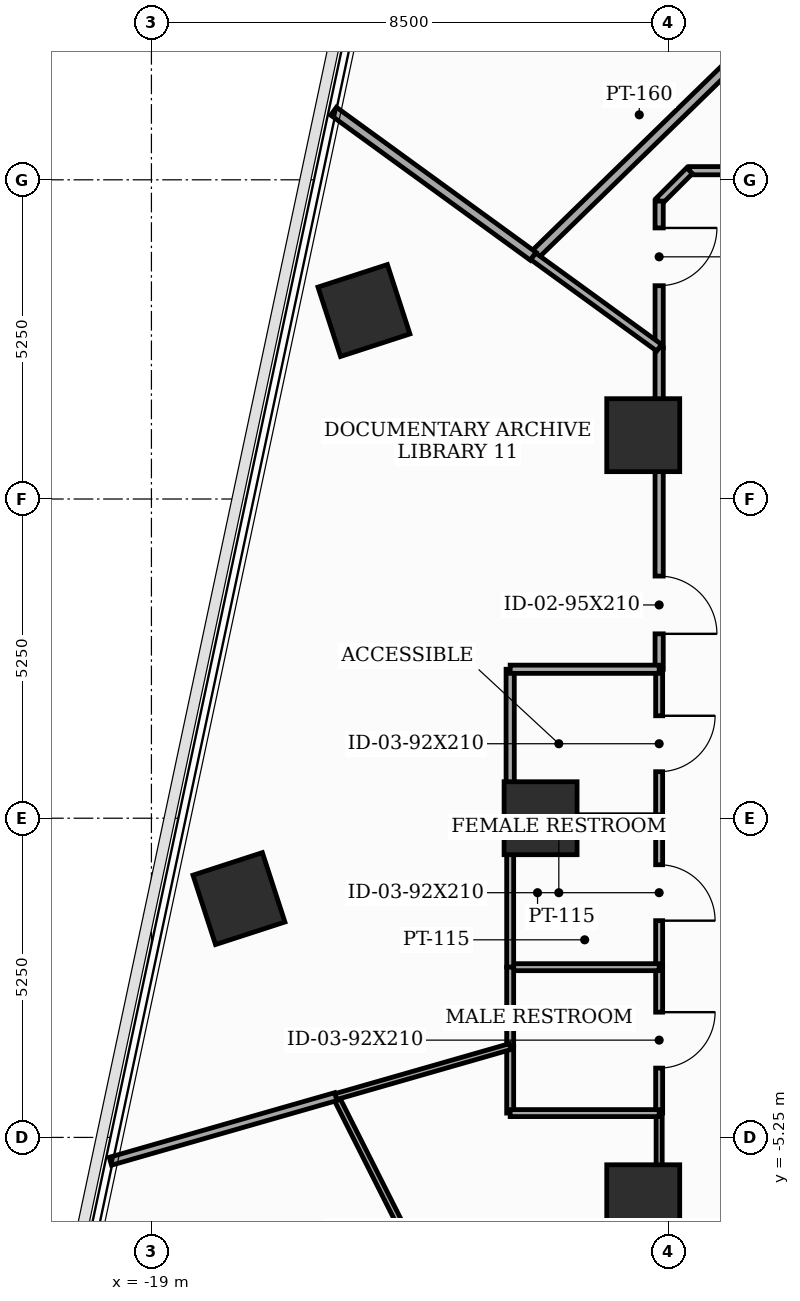
"""IFC4 building model, lengths in metres.
Left out: names, types, materials, properties, quantities, classifications, styles, units other than length and angle.
Written with IfcOpenShell. Run it as: python <this file> out.ifc"""

import sys

from ifc_helpers import new_model, si_unit, direction, frame, frame_2d, origin, origin_2d, place, context, subcontext, project, spatial, rectangle, extrude, element, fill, save


model = new_model("IFC4")
c1 = context("Model", 3, precision=1e-05, world=origin(), true_north=direction((0.0, 1.0)))
c2 = subcontext(c1, "Body", "Model", "MODEL_VIEW")
j1 = project(units=[si_unit("LENGTHUNIT", "METRE"), si_unit("PLANEANGLEUNIT", "RADIAN")], contexts=[c1])
p1 = place(None, origin())
s1 = spatial("IfcSite", under=j1, at=p1, CompositionType="ELEMENT")
p2 = place(p1, origin())
s2 = spatial("IfcBuilding", under=s1, at=p2, CompositionType="ELEMENT")
p3 = place(p2, frame((0.0, 0.0, 94.0)))
s3 = spatial("IfcBuildingStorey", under=s2, at=p3, CompositionType="ELEMENT", Elevation=94.0)
for number, where, z_axis, x_axis in (
    (1, (-10.912, 6.3, 0.0), (0.0, 0.0, 1.0), (1.0, 0.0, 0.0)),
    (2, (-12.6, 0.0, 0.0), (0.0, 0.0, 1.0), (1.0, 0.0, 0.0)),
    (3, (-10.912, -6.3, 0.0), (0.0, 0.0, 1.0), (1.0, 0.0, 0.0)),
    (4, (-15.505, 8.35, 0.0), (0.0, 0.0, 1.0), (0.951, 0.309, 0.0)),
    (5, (-17.561, -1.322, 0.0), (0.0, 0.0, 1.0), (0.951, 0.309, 0.0)),
):
    element("IfcColumn", number, at=place(p3, frame(where, z_axis=z_axis, x_axis=x_axis)), inside=s3, PredefinedType="COLUMN", context=c2, shape_type="SweptSolid", body=[
        extrude(rectangle(XDim=1.2, YDim=1.2, at=origin_2d()), origin(), (0.0, 0.0, 1.0), 3.7),
    ])
p4 = place(p3, frame((-10.65, 0.0, 0.0), z_axis=(0.0, 0.0, 1.0), x_axis=(0.0, -1.0, 0.0)))
e6 = element("IfcWall", 6, at=p4, inside=s3, PredefinedType="PARTITIONING", context=c2, shape_type="SweptSolid", body=[
    extrude(rectangle(XDim=2.45, YDim=0.115, at=frame_2d((1.225, 0.0))), origin(), (0.0, 0.0, 1.0), 2.785),
])
p5 = place(p4, frame((0.765, 0.0, 0.0)))
e7 = element("IfcOpeningElement", 7, at=p5, cuts=e6, PredefinedType="OPENING", context=c2, shape_type="SweptSolid", body=[
    extrude(rectangle(XDim=0.92, YDim=2.1, at=frame_2d((0.46, 1.05))), frame((0.0, 0.067, 0.0), z_axis=(0.0, -1.0, 0.0), x_axis=(1.0, 0.0, 0.0)), (0.0, 0.0, 1.0), 0.135),
])
p6 = place(p3, frame((-10.65, -2.45, 0.0), z_axis=(0.0, 0.0, 1.0), x_axis=(0.0, -1.0, 0.0)))
e8 = element("IfcWall", 8, at=p6, inside=s3, PredefinedType="PARTITIONING", context=c2, shape_type="SweptSolid", body=[
    extrude(rectangle(XDim=2.4, YDim=0.115, at=frame_2d((1.2, 0.0))), origin(), (0.0, 0.0, 1.0), 3.5),
])
p7 = place(p6, frame((0.74, 0.0, 0.0)))
e9 = element("IfcOpeningElement", 9, at=p7, cuts=e8, PredefinedType="OPENING", context=c2, shape_type="SweptSolid", body=[
    extrude(rectangle(XDim=0.92, YDim=2.1, at=frame_2d((0.46, 1.05))), frame((0.0, 0.067, 0.0), z_axis=(0.0, -1.0, 0.0), x_axis=(1.0, 0.0, 0.0)), (0.0, 0.0, 1.0), 0.135),
])
p8 = place(p3, frame((-10.65, -4.85, 0.0), z_axis=(0.0, 0.0, 1.0), x_axis=(0.0, -1.0, 0.0)))
e10 = element("IfcWall", 10, at=p8, inside=s3, PredefinedType="MOVABLE", context=c2, shape_type="SweptSolid", body=[
    extrude(rectangle(XDim=5.3, YDim=0.1, at=frame_2d((2.65, 0.0))), origin(), (0.0, 0.0, 1.0), 2.785),
])
p9 = place(p8, frame((3.765, 0.0, 0.0)))
e11 = element("IfcOpeningElement", 11, at=p9, cuts=e10, PredefinedType="OPENING", context=c2, shape_type="SweptSolid", body=[
    extrude(rectangle(XDim=0.95, YDim=2.1, at=frame_2d((0.475, 1.05))), frame((0.0, 0.06, 0.0), z_axis=(0.0, -1.0, 0.0), x_axis=(1.0, 0.0, 0.0)), (0.0, 0.0, 1.0), 0.12),
])
p10 = place(p3, frame((-2.264, 10.65, 0.0), z_axis=(0.0, 0.0, 1.0), x_axis=(-1.0, 0.0, 0.0)))
e12 = element("IfcWall", 12, at=p10, inside=s3, PredefinedType="PARTITIONING", context=c2, shape_type="SweptSolid", body=[
    extrude(rectangle(XDim=7.886, YDim=0.135, at=frame_2d((3.943, 0.0))), origin(), (0.0, 0.0, 1.0), 2.785),
])
p11 = place(p3, frame((-10.15, 10.65, 0.0), z_axis=(0.0, 0.0, 1.0), x_axis=(-0.707106781187, -0.707106781187, 0.0)))
e13 = element("IfcWall", 13, at=p11, inside=s3, PredefinedType="PARTITIONING", context=c2, shape_type="SweptSolid", body=[
    extrude(rectangle(XDim=0.707, YDim=0.135, at=frame_2d((0.354, 0.0))), origin(), (0.0, 0.0, 1.0), 3.5),
])
p12 = place(p3, frame((-10.65, 10.15, 0.0), z_axis=(0.0, 0.0, 1.0), x_axis=(0.0, -1.0, 0.0)))
e14 = element("IfcWall", 14, at=p12, inside=s3, PredefinedType="PARTITIONING", context=c2, shape_type="SweptSolid", body=[
    extrude(rectangle(XDim=2.412, YDim=0.135, at=frame_2d((1.206, 0.0))), origin(), (0.0, 0.0, 1.0), 3.5),
])
p13 = place(p12, frame((0.442, 0.0, 0.0)))
e15 = element("IfcOpeningElement", 15, at=p13, cuts=e14, PredefinedType="OPENING", context=c2, shape_type="SweptSolid", body=[
    extrude(rectangle(XDim=0.95, YDim=2.1, at=frame_2d((0.475, 1.05))), frame((0.0, 0.077, 0.0), z_axis=(0.0, -1.0, 0.0), x_axis=(1.0, 0.0, 0.0)), (0.0, 0.0, 1.0), 0.155),
])
p14 = place(p3, frame((-10.65, 7.738, 0.0), z_axis=(0.0, 0.0, 1.0), x_axis=(0.0, -1.0, 0.0)))
e16 = element("IfcWall", 16, at=p14, inside=s3, PredefinedType="PARTITIONING", context=c2, shape_type="SweptSolid", body=[
    extrude(rectangle(XDim=5.288, YDim=0.135, at=frame_2d((2.644, 0.0))), origin(), (0.0, 0.0, 1.0), 2.785),
])
p15 = place(p14, frame((3.755, 0.0, 0.0)))
e17 = element("IfcOpeningElement", 17, at=p15, cuts=e16, PredefinedType="OPENING", context=c2, shape_type="SweptSolid", body=[
    extrude(rectangle(XDim=0.95, YDim=2.1, at=frame_2d((0.475, 1.05))), frame((0.0, 0.077, 0.0), z_axis=(0.0, -1.0, 0.0), x_axis=(1.0, 0.0, 0.0)), (0.0, 0.0, 1.0), 0.155),
])
p16 = place(p3, frame((-10.65, 2.45, 0.0), z_axis=(0.0, 0.0, 1.0), x_axis=(0.0, -1.0, 0.0)))
e18 = element("IfcWall", 18, at=p16, inside=s3, PredefinedType="PARTITIONING", context=c2, shape_type="SweptSolid", body=[
    extrude(rectangle(XDim=2.45, YDim=0.115, at=frame_2d((1.225, 0.0))), origin(), (0.0, 0.0, 1.0), 2.785),
])
p17 = place(p16, frame((0.765, 0.0, 0.0)))
e19 = element("IfcOpeningElement", 19, at=p17, cuts=e18, PredefinedType="OPENING", context=c2, shape_type="SweptSolid", body=[
    extrude(rectangle(XDim=0.92, YDim=2.1, at=frame_2d((0.46, 1.05))), frame((0.0, 0.067, 0.0), z_axis=(0.0, -1.0, 0.0), x_axis=(1.0, 0.0, 0.0)), (0.0, 0.0, 1.0), 0.135),
])
p18 = place(p3, frame((-13.1, -2.45, 0.0), z_axis=(0.0, 0.0, 1.0), x_axis=(1.0, 0.0, 0.0)))
e20 = element("IfcWall", 20, at=p18, inside=s3, PredefinedType="PARTITIONING", context=c2, shape_type="SweptSolid", body=[
    extrude(rectangle(XDim=2.45, YDim=0.115, at=frame_2d((1.225, 0.0))), origin(), (0.0, 0.0, 1.0), 2.785),
])
p19 = place(p3, frame((-13.1, 0.0, 0.0), z_axis=(0.0, 0.0, 1.0), x_axis=(0.0, -1.0, 0.0)))
e21 = element("IfcWall", 21, at=p19, inside=s3, PredefinedType="PARTITIONING", context=c2, shape_type="SweptSolid", body=[
    extrude(rectangle(XDim=2.45, YDim=0.115, at=frame_2d((1.225, 0.0))), origin(), (0.0, 0.0, 1.0), 2.785),
])
p20 = place(p3, frame((-10.65, 0.0, 0.0), z_axis=(0.0, 0.0, 1.0), x_axis=(-1.0, 0.0, 0.0)))
e22 = element("IfcWall", 22, at=p20, inside=s3, PredefinedType="PARTITIONING", context=c2, shape_type="SweptSolid", body=[
    extrude(rectangle(XDim=2.45, YDim=0.115, at=frame_2d((1.225, 0.0))), origin(), (0.0, 0.0, 1.0), 2.785),
])
p21 = place(p3, frame((-13.1, -3.756, 0.0), z_axis=(0.0, 0.0, 1.0), x_axis=(0.0, -1.0, 0.0)))
e23 = element("IfcWall", 23, at=p21, inside=s3, PredefinedType="PARTITIONING", context=c2, shape_type="SweptSolid", body=[
    extrude(rectangle(XDim=1.094, YDim=0.115, at=frame_2d((0.547, 0.0))), origin(), (0.0, 0.0, 1.0), 3.5),
])
p22 = place(p3, frame((-13.1, -4.85, 0.0), z_axis=(0.0, 0.0, 1.0), x_axis=(1.0, 0.0, 0.0)))
e24 = element("IfcWall", 24, at=p22, inside=s3, PredefinedType="PARTITIONING", context=c2, shape_type="SweptSolid", body=[
    extrude(rectangle(XDim=2.45, YDim=0.115, at=frame_2d((1.225, 0.0))), origin(), (0.0, 0.0, 1.0), 2.785),
])
p23 = place(p3, frame((-13.1, -2.45, 0.0), z_axis=(0.0, 0.0, 1.0), x_axis=(0.0, -1.0, 0.0)))
e25 = element("IfcWall", 25, at=p23, inside=s3, PredefinedType="PARTITIONING", context=c2, shape_type="SweptSolid", body=[
    extrude(rectangle(XDim=1.306, YDim=0.115, at=frame_2d((0.653, 0.0))), origin(), (0.0, 0.0, 1.0), 3.5),
])
p24 = place(p3, frame((-15.968, -4.579, 0.0), z_axis=(0.0, 0.0, 1.0), x_axis=(0.450166439867, -0.892944665933, 0.0)))
e26 = element("IfcWall", 26, at=p24, inside=s3, PredefinedType="MOVABLE", context=c2, shape_type="SweptSolid", body=[
    extrude(rectangle(XDim=6.642, YDim=0.1, at=frame_2d((3.321, 0.0))), origin(), (0.0, 0.0, 1.0), 2.785),
])
p25 = place(p3, frame((-13.1, -3.756, 0.0), z_axis=(0.0, 0.0, 1.0), x_axis=(-0.961205264208, -0.275834080671, 0.0)))
e27 = element("IfcWall", 27, at=p25, inside=s3, PredefinedType="MOVABLE", context=c2, shape_type="SweptSolid", body=[
    extrude(rectangle(XDim=2.984, YDim=0.1, at=frame_2d((1.492, 0.0))), origin(), (0.0, 0.0, 1.0), 3.125),
])
p26 = place(p3, frame((-15.968, -4.579, 0.0), z_axis=(0.0, 0.0, 1.0), x_axis=(-0.961294264275, -0.275523751194, 0.0)))
e28 = element("IfcWall", 28, at=p26, inside=s3, PredefinedType="PARTITIONING", context=c2, shape_type="SweptSolid", body=[
    extrude(rectangle(XDim=3.856, YDim=0.135, at=frame_2d((1.928, 0.0))), origin(), (0.0, 0.0, 1.0), 2.935),
])
p27 = place(p3, frame((-12.721, 9.242, 0.0), z_axis=(0.0, 0.0, 1.0), x_axis=(0.716351016203, 0.697740081682, 0.0)))
e29 = element("IfcWall", 29, at=p27, inside=s3, PredefinedType="PARTITIONING", context=c2, shape_type="SweptSolid", body=[
    extrude(rectangle(XDim=5.746, YDim=0.16, at=frame_2d((2.873, 0.0))), origin(), (0.0, 0.0, 1.0), 2.785),
])
p28 = place(p3, frame((-16.004, 11.628, 0.0), z_axis=(0.0, 0.0, 1.0), x_axis=(0.80899612579, -0.587813974364, 0.0)))
e30 = element("IfcWall", 30, at=p28, inside=s3, PredefinedType="PARTITIONING", context=c2, shape_type="SweptSolid", body=[
    extrude(rectangle(XDim=4.059, YDim=0.16, at=frame_2d((2.029, 0.0))), origin(), (0.0, 0.0, 1.0), 2.925),
])
p29 = place(p3, frame((-12.721, 9.242, 0.0), z_axis=(0.0, 0.0, 1.0), x_axis=(0.80916485127, -0.58758169089, 0.0)))
e31 = element("IfcWall", 31, at=p29, inside=s3, PredefinedType="PARTITIONING", context=c2, shape_type="SweptSolid", body=[
    extrude(rectangle(XDim=2.56, YDim=0.135, at=frame_2d((1.28, 0.0))), origin(), (0.0, 0.0, 1.0), 3.125),
])
p30 = place(p3, frame((-13.1, 0.0, 0.0), z_axis=(0.0, 0.0, 1.0), x_axis=(0.0, 1.0, 0.0)))
e32 = element("IfcWall", 32, at=p30, inside=s3, PredefinedType="PARTITIONING", context=c2, shape_type="SweptSolid", body=[
    extrude(rectangle(XDim=2.45, YDim=0.135, at=frame_2d((1.225, 0.0))), origin(), (0.0, 0.0, 1.0), 2.785),
])
p31 = place(p3, frame((-13.1, 2.45, 0.0), z_axis=(0.0, 0.0, 1.0), x_axis=(1.0, 0.0, 0.0)))
e33 = element("IfcWall", 33, at=p31, inside=s3, PredefinedType="PARTITIONING", context=c2, shape_type="SweptSolid", body=[
    extrude(rectangle(XDim=2.45, YDim=0.135, at=frame_2d((1.225, 0.0))), origin(), (0.0, 0.0, 1.0), 2.785),
])
p32 = place(p5, origin())
e34 = element("IfcDoor", 34, at=p32, inside=s3, OperationType="SINGLE_SWING_RIGHT", PredefinedType="DOOR", context=c2, shape_type="SweptSolid", body=[
    extrude(rectangle(XDim=0.92, YDim=2.1, at=frame_2d((0.46, 1.05))), frame((0.0, 0.025, 0.0), z_axis=(0.0, -1.0, 0.0), x_axis=(1.0, 0.0, 0.0)), (0.0, 0.0, 1.0), 0.05),
])
fill(e7, e34)
p33 = place(p7, origin())
e35 = element("IfcDoor", 35, at=p33, inside=s3, OperationType="SINGLE_SWING_LEFT", PredefinedType="DOOR", context=c2, shape_type="SweptSolid", body=[
    extrude(rectangle(XDim=0.92, YDim=2.1, at=frame_2d((0.46, 1.05))), frame((0.0, 0.025, 0.0), z_axis=(0.0, -1.0, 0.0), x_axis=(1.0, 0.0, 0.0)), (0.0, 0.0, 1.0), 0.05),
])
fill(e9, e35)
p34 = place(p13, origin())
e36 = element("IfcDoor", 36, at=p34, inside=s3, OperationType="SINGLE_SWING_LEFT", PredefinedType="DOOR", context=c2, shape_type="SweptSolid", body=[
    extrude(rectangle(XDim=0.95, YDim=2.1, at=frame_2d((0.475, 1.05))), frame((0.0, 0.025, 0.0), z_axis=(0.0, -1.0, 0.0), x_axis=(1.0, 0.0, 0.0)), (0.0, 0.0, 1.0), 0.05),
])
fill(e15, e36)
p35 = place(p15, origin())
e37 = element("IfcDoor", 37, at=p35, inside=s3, OperationType="SINGLE_SWING_RIGHT", PredefinedType="DOOR", context=c2, shape_type="SweptSolid", body=[
    extrude(rectangle(XDim=0.95, YDim=2.1, at=frame_2d((0.475, 1.05))), frame((0.0, 0.025, 0.0), z_axis=(0.0, -1.0, 0.0), x_axis=(1.0, 0.0, 0.0)), (0.0, 0.0, 1.0), 0.05),
])
fill(e17, e37)
p36 = place(p17, origin())
e38 = element("IfcDoor", 38, at=p36, inside=s3, OperationType="SINGLE_SWING_LEFT", PredefinedType="DOOR", context=c2, shape_type="SweptSolid", body=[
    extrude(rectangle(XDim=0.92, YDim=2.1, at=frame_2d((0.46, 1.05))), frame((0.0, 0.025, 0.0), z_axis=(0.0, -1.0, 0.0), x_axis=(1.0, 0.0, 0.0)), (0.0, 0.0, 1.0), 0.05),
])
fill(e19, e38)
save(model, sys.argv[1])
